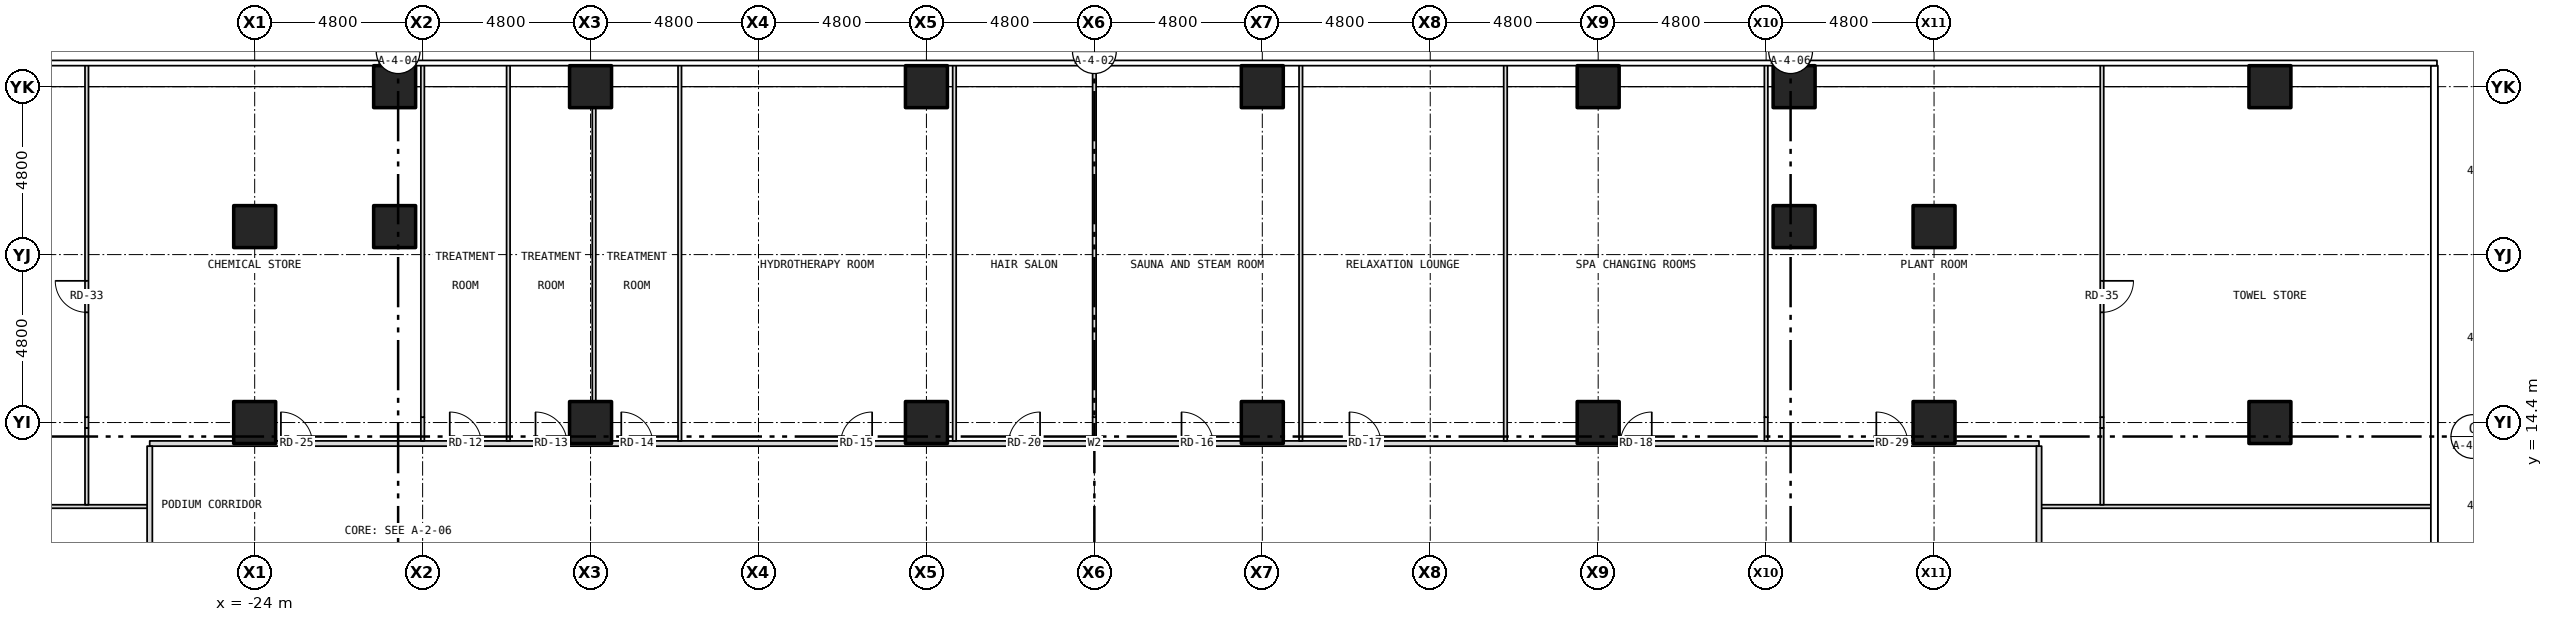
"""IFC4 building model, lengths in metres.
Left out: names, types, materials, properties, quantities, classifications, styles, units other than length and angle.
Written with IfcOpenShell. Run it as: python <this file> out.ifc"""

import sys

from ifc_helpers import new_model, si_unit, direction, frame, frame_2d, origin, origin_2d, place, context, subcontext, project, spatial, rectangle, hollow_rectangle, extrude, element, fill, save


model = new_model("IFC4")
c1 = context("Model", 3, precision=1e-05, world=origin(), true_north=direction((0.0, 1.0)))
c2 = subcontext(c1, "Body", "Model", "MODEL_VIEW")
j1 = project(units=[si_unit("LENGTHUNIT", "METRE"), si_unit("PLANEANGLEUNIT", "RADIAN")], contexts=[c1])
p1 = place(None, origin())
s1 = spatial("IfcSite", under=j1, at=p1, CompositionType="ELEMENT")
p2 = place(p1, origin())
s2 = spatial("IfcBuilding", under=s1, at=p2, CompositionType="ELEMENT")
p3 = place(p2, frame((0.0, 0.0, 20.0)))
s3 = spatial("IfcBuildingStorey", under=s2, at=p3, CompositionType="ELEMENT", Elevation=20.0)
for number, where, z_axis, x_axis in (
    (1, (-20.0, 24.0, -0.2), (0.0, 0.0, 1.0), (1.0, 0.0, 0.0)),
    (2, (-14.4, 24.0, -0.2), (0.0, 0.0, 1.0), (1.0, 0.0, 0.0)),
    (3, (-4.8, 24.0, -0.2), (0.0, 0.0, 1.0), (1.0, 0.0, 0.0)),
    (4, (4.8, 24.0, -0.2), (0.0, 0.0, 1.0), (1.0, 0.0, 0.0)),
    (5, (14.4, 24.0, -0.2), (0.0, 0.0, 1.0), (1.0, 0.0, 0.0)),
    (6, (20.0, 24.0, -0.2), (0.0, 0.0, 1.0), (1.0, 0.0, 0.0)),
    (7, (33.6, 14.4, -0.2), (0.0, 0.0, 1.0), (1.0, 0.0, 0.0)),
    (8, (33.6, 24.0, -0.2), (0.0, 0.0, 1.0), (1.0, 0.0, 0.0)),
    (9, (-24.0, 14.4, -0.2), (0.0, 0.0, 1.0), (1.0, 0.0, 0.0)),
    (10, (-24.0, 20.0, -0.2), (0.0, 0.0, 1.0), (1.0, 0.0, 0.0)),
    (11, (-20.0, 20.0, -0.2), (0.0, 0.0, 1.0), (1.0, 0.0, 0.0)),
    (12, (-14.4, 14.4, -0.2), (0.0, 0.0, 1.0), (1.0, 0.0, 0.0)),
    (13, (-4.8, 14.4, -0.2), (0.0, 0.0, 1.0), (1.0, 0.0, 0.0)),
    (14, (4.8, 14.4, -0.2), (0.0, 0.0, 1.0), (1.0, 0.0, 0.0)),
    (15, (14.4, 14.4, -0.2), (0.0, 0.0, 1.0), (1.0, 0.0, 0.0)),
    (16, (20.0, 20.0, -0.2), (0.0, 0.0, 1.0), (1.0, 0.0, 0.0)),
    (17, (24.0, 14.4, -0.2), (0.0, 0.0, 1.0), (1.0, 0.0, 0.0)),
    (18, (24.0, 20.0, -0.2), (0.0, 0.0, 1.0), (1.0, 0.0, 0.0)),
):
    element("IfcColumn", number, at=place(p3, frame(where, z_axis=z_axis, x_axis=x_axis)), inside=s3, PredefinedType="COLUMN", context=c2, shape_type="SweptSolid", body=[
        extrude(hollow_rectangle(XDim=1.2, YDim=1.2, WallThickness=0.07, at=origin_2d()), origin(), (0.0, 0.0, 1.0), 4.5),
    ])
for number, where, z_axis, x_axis in (
    (19, (-38.28, 12.0, 0.0), (0.0, 0.0, 1.0), (1.0, 0.0, 0.0)),
    (20, (27.0, 12.0, 0.0), (0.0, 0.0, 1.0), (1.0, 0.0, 0.0)),
):
    element("IfcWall", number, at=place(p3, frame(where, z_axis=z_axis, x_axis=x_axis)), inside=s3, PredefinedType="PARTITIONING", context=c2, shape_type="SweptSolid", body=[
        extrude(rectangle(XDim=11.28, YDim=0.1, at=frame_2d((5.64, 0.0))), origin(), (0.0, 0.0, 1.0), 4.3),
    ])
p4 = place(p3, frame((-27.0, 13.8, 0.0), z_axis=(0.0, 0.0, 1.0), x_axis=(1.0, 0.0, 0.0)))
e21 = element("IfcWall", 21, at=p4, inside=s3, PredefinedType="PARTITIONING", context=c2, shape_type="SweptSolid", body=[
    extrude(rectangle(XDim=54.0, YDim=0.15, at=frame_2d((27.0, 0.0))), origin(), (0.0, 0.0, 1.0), 4.3),
])
p5 = place(p4, frame((8.576, 0.0, 0.0)))
e22 = element("IfcOpeningElement", 22, at=p5, cuts=e21, PredefinedType="OPENING", context=c2, shape_type="SweptSolid", body=[
    extrude(rectangle(XDim=0.9, YDim=2.1, at=frame_2d((0.45, 1.05))), frame((0.0, 0.087, 0.0), z_axis=(0.0, -1.0, 0.0), x_axis=(1.0, 0.0, 0.0)), (0.0, 0.0, 1.0), 0.174),
])
p6 = place(p4, frame((11.027, 0.0, 0.0)))
e23 = element("IfcOpeningElement", 23, at=p6, cuts=e21, PredefinedType="OPENING", context=c2, shape_type="SweptSolid", body=[
    extrude(rectangle(XDim=0.9, YDim=2.1, at=frame_2d((0.45, 1.05))), frame((0.0, 0.087, 0.0), z_axis=(0.0, -1.0, 0.0), x_axis=(1.0, 0.0, 0.0)), (0.0, 0.0, 1.0), 0.174),
])
p7 = place(p4, frame((13.478, 0.0, 0.0)))
e24 = element("IfcOpeningElement", 24, at=p7, cuts=e21, PredefinedType="OPENING", context=c2, shape_type="SweptSolid", body=[
    extrude(rectangle(XDim=0.9, YDim=2.1, at=frame_2d((0.45, 1.05))), frame((0.0, 0.087, 0.0), z_axis=(0.0, -1.0, 0.0), x_axis=(1.0, 0.0, 0.0)), (0.0, 0.0, 1.0), 0.174),
])
p8 = place(p4, frame((19.748, 0.0, 0.0)))
e25 = element("IfcOpeningElement", 25, at=p8, cuts=e21, PredefinedType="OPENING", context=c2, shape_type="SweptSolid", body=[
    extrude(rectangle(XDim=0.9, YDim=2.1, at=frame_2d((0.45, 1.05))), frame((0.0, 0.087, 0.0), z_axis=(0.0, -1.0, 0.0), x_axis=(1.0, 0.0, 0.0)), (0.0, 0.0, 1.0), 0.174),
])
p9 = place(p4, frame((29.491, 0.0, 0.0)))
e26 = element("IfcOpeningElement", 26, at=p9, cuts=e21, PredefinedType="OPENING", context=c2, shape_type="SweptSolid", body=[
    extrude(rectangle(XDim=0.9, YDim=2.1, at=frame_2d((0.45, 1.05))), frame((0.0, 0.087, 0.0), z_axis=(0.0, -1.0, 0.0), x_axis=(1.0, 0.0, 0.0)), (0.0, 0.0, 1.0), 0.174),
])
p10 = place(p4, frame((34.291, 0.0, 0.0)))
e27 = element("IfcOpeningElement", 27, at=p10, cuts=e21, PredefinedType="OPENING", context=c2, shape_type="SweptSolid", body=[
    extrude(rectangle(XDim=0.9, YDim=2.1, at=frame_2d((0.45, 1.05))), frame((0.0, 0.087, 0.0), z_axis=(0.0, -1.0, 0.0), x_axis=(1.0, 0.0, 0.0)), (0.0, 0.0, 1.0), 0.174),
])
p11 = place(p4, frame((42.032, 0.0, 0.0)))
e28 = element("IfcOpeningElement", 28, at=p11, cuts=e21, PredefinedType="OPENING", context=c2, shape_type="SweptSolid", body=[
    extrude(rectangle(XDim=0.9, YDim=2.1, at=frame_2d((0.45, 1.05))), frame((0.0, 0.087, 0.0), z_axis=(0.0, -1.0, 0.0), x_axis=(1.0, 0.0, 0.0)), (0.0, 0.0, 1.0), 0.174),
])
p12 = place(p4, frame((24.548, 0.0, 0.0)))
e29 = element("IfcOpeningElement", 29, at=p12, cuts=e21, PredefinedType="OPENING", context=c2, shape_type="SweptSolid", body=[
    extrude(rectangle(XDim=0.9, YDim=2.1, at=frame_2d((0.45, 1.05))), frame((0.0, 0.087, 0.0), z_axis=(0.0, -1.0, 0.0), x_axis=(1.0, 0.0, 0.0)), (0.0, 0.0, 1.0), 0.174),
])
p13 = place(p4, frame((3.75, 0.0, 0.0)))
e30 = element("IfcOpeningElement", 30, at=p13, cuts=e21, PredefinedType="OPENING", context=c2, shape_type="SweptSolid", body=[
    extrude(rectangle(XDim=0.9, YDim=2.1, at=frame_2d((0.45, 1.05))), frame((0.0, 0.087, 0.0), z_axis=(0.0, -1.0, 0.0), x_axis=(1.0, 0.0, 0.0)), (0.0, 0.0, 1.0), 0.174),
])
p14 = place(p4, frame((49.35, 0.0, 0.0)))
e31 = element("IfcOpeningElement", 31, at=p14, cuts=e21, PredefinedType="OPENING", context=c2, shape_type="SweptSolid", body=[
    extrude(rectangle(XDim=0.9, YDim=2.1, at=frame_2d((0.45, 1.05))), frame((0.0, 0.087, 0.0), z_axis=(0.0, -1.0, 0.0), x_axis=(1.0, 0.0, 0.0)), (0.0, 0.0, 1.0), 0.174),
])
p15 = place(p3, frame((-28.8, 12.05, 0.0), z_axis=(0.0, 0.0, 1.0), x_axis=(0.0, 1.0, 0.0)))
e32 = element("IfcWall", 32, at=p15, inside=s3, PredefinedType="PARTITIONING", context=c2, shape_type="SweptSolid", body=[
    extrude(rectangle(XDim=2.196, YDim=0.1, at=frame_2d((1.098, 0.0))), origin(), (0.0, 0.0, 1.0), 3.683),
])
p16 = place(p3, frame((-28.8, 14.246, 0.0), z_axis=(0.0, 0.0, 1.0), x_axis=(0.0, 1.0, 0.0)))
e33 = element("IfcWall", 33, at=p16, inside=s3, PredefinedType="PARTITIONING", context=c2, shape_type="SweptSolid", body=[
    extrude(rectangle(XDim=0.308, YDim=0.1, at=frame_2d((0.154, 0.0))), origin(), (0.0, 0.0, 1.0), 4.3),
])
p17 = place(p3, frame((-28.8, 14.554, 0.0), z_axis=(0.0, 0.0, 1.0), x_axis=(0.0, 1.0, 0.0)))
e34 = element("IfcWall", 34, at=p17, inside=s3, PredefinedType="PARTITIONING", context=c2, shape_type="SweptSolid", body=[
    extrude(rectangle(XDim=10.076, YDim=0.1, at=frame_2d((5.038, 0.0))), origin(), (0.0, 0.0, 1.0), 3.683),
])
p18 = place(p17, frame((2.996, 0.0, 0.0)))
e35 = element("IfcOpeningElement", 35, at=p18, cuts=e34, PredefinedType="OPENING", context=c2, shape_type="SweptSolid", body=[
    extrude(rectangle(XDim=0.9, YDim=2.1, at=frame_2d((0.45, 1.05))), frame((0.0, 0.062, 0.0), z_axis=(0.0, -1.0, 0.0), x_axis=(1.0, 0.0, 0.0)), (0.0, 0.0, 1.0), 0.124),
])
p19 = place(p3, frame((-27.0, -13.725, 0.0), z_axis=(0.0, 0.0, 1.0), x_axis=(0.0, 1.0, 0.0)))
e36 = element("IfcWall", 36, at=p19, inside=s3, PredefinedType="PARTITIONING", context=c2, shape_type="SweptSolid", body=[
    extrude(rectangle(XDim=27.45, YDim=0.15, at=frame_2d((13.725, 0.0))), origin(), (0.0, 0.0, 1.0), 4.3),
])
p20 = place(p19, frame((7.275, 0.0, 0.0)))
e37 = element("IfcOpeningElement", 37, at=p20, cuts=e36, PredefinedType="OPENING", context=c2, shape_type="SweptSolid", body=[
    extrude(rectangle(XDim=0.9, YDim=2.1, at=frame_2d((0.45, 1.05))), frame((0.0, 0.087, 0.0), z_axis=(0.0, -1.0, 0.0), x_axis=(1.0, 0.0, 0.0)), (0.0, 0.0, 1.0), 0.174),
])
p21 = place(p19, frame((19.275, 0.0, 0.0)))
e38 = element("IfcOpeningElement", 38, at=p21, cuts=e36, PredefinedType="OPENING", context=c2, shape_type="SweptSolid", body=[
    extrude(rectangle(XDim=0.9, YDim=2.1, at=frame_2d((0.45, 1.05))), frame((0.0, 0.087, 0.0), z_axis=(0.0, -1.0, 0.0), x_axis=(1.0, 0.0, 0.0)), (0.0, 0.0, 1.0), 0.174),
])
p22 = place(p3, frame((-19.2, 13.875, 0.0), z_axis=(0.0, 0.0, 1.0), x_axis=(0.0, 1.0, 0.0)))
e39 = element("IfcWall", 39, at=p22, inside=s3, PredefinedType="PARTITIONING", context=c2, shape_type="SweptSolid", body=[
    extrude(rectangle(XDim=0.679, YDim=0.1, at=frame_2d((0.339, 0.0))), origin(), (0.0, 0.0, 1.0), 4.3),
])
p23 = place(p3, frame((-19.2, 14.554, 0.0), z_axis=(0.0, 0.0, 1.0), x_axis=(0.0, 1.0, 0.0)))
e40 = element("IfcWall", 40, at=p23, inside=s3, PredefinedType="PARTITIONING", context=c2, shape_type="SweptSolid", body=[
    extrude(rectangle(XDim=10.076, YDim=0.1, at=frame_2d((5.038, 0.0))), origin(), (0.0, 0.0, 1.0), 3.683),
])
p24 = place(p3, frame((-16.75, 13.875, 0.0), z_axis=(0.0, 0.0, 1.0), x_axis=(0.0, 1.0, 0.0)))
e41 = element("IfcWall", 41, at=p24, inside=s3, PredefinedType="PARTITIONING", context=c2, shape_type="SweptSolid", body=[
    extrude(rectangle(XDim=10.755, YDim=0.1, at=frame_2d((5.377, 0.0))), origin(), (0.0, 0.0, 1.0), 4.3),
])
p25 = place(p3, frame((-14.3, 13.875, 0.0), z_axis=(0.0, 0.0, 1.0), x_axis=(0.0, 1.0, 0.0)))
e42 = element("IfcWall", 42, at=p25, inside=s3, PredefinedType="PARTITIONING", context=c2, shape_type="SweptSolid", body=[
    extrude(rectangle(XDim=1.125, YDim=0.1, at=frame_2d((0.562, 0.0))), origin(), (0.0, 0.0, 1.0), 4.3),
])
p26 = place(p3, frame((-14.3, 15.0, 0.0), z_axis=(0.0, 0.0, 1.0), x_axis=(0.0, 1.0, 0.0)))
e43 = element("IfcWall", 43, at=p26, inside=s3, PredefinedType="PARTITIONING", context=c2, shape_type="SweptSolid", body=[
    extrude(rectangle(XDim=8.4, YDim=0.1, at=frame_2d((4.2, 0.0))), origin(), (0.0, 0.0, 1.0), 3.373),
])
p27 = place(p3, frame((-14.3, 23.4, 0.0), z_axis=(0.0, 0.0, 1.0), x_axis=(0.0, 1.0, 0.0)))
e44 = element("IfcWall", 44, at=p27, inside=s3, PredefinedType="PARTITIONING", context=c2, shape_type="SweptSolid", body=[
    extrude(rectangle(XDim=0.48, YDim=0.1, at=frame_2d((0.24, 0.0))), origin(), (0.0, 0.0, 1.0), 4.3),
])
for number, where, z_axis, x_axis in (
    (45, (-11.85, 13.875, 0.0), (0.0, 0.0, 1.0), (0.0, 1.0, 0.0)),
    (46, (-4.0, 13.875, 0.0), (0.0, 0.0, 1.0), (0.0, 1.0, 0.0)),
):
    element("IfcWall", number, at=place(p3, frame(where, z_axis=z_axis, x_axis=x_axis)), inside=s3, PredefinedType="PARTITIONING", context=c2, shape_type="SweptSolid", body=[
        extrude(rectangle(XDim=10.755, YDim=0.1, at=frame_2d((5.377, 0.0))), origin(), (0.0, 0.0, 1.0), 4.3),
    ])
p28 = place(p3, frame((0.0, 13.875, 0.0), z_axis=(0.0, 0.0, 1.0), x_axis=(0.0, 1.0, 0.0)))
e47 = element("IfcWall", 47, at=p28, inside=s3, PredefinedType="PARTITIONING", context=c2, shape_type="SweptSolid", body=[
    extrude(rectangle(XDim=0.679, YDim=0.1, at=frame_2d((0.339, 0.0))), origin(), (0.0, 0.0, 1.0), 4.3),
])
p29 = place(p3, frame((0.0, 14.554, 0.0), z_axis=(0.0, 0.0, 1.0), x_axis=(0.0, 1.0, 0.0)))
e48 = element("IfcWall", 48, at=p29, inside=s3, PredefinedType="PARTITIONING", context=c2, shape_type="SweptSolid", body=[
    extrude(rectangle(XDim=10.076, YDim=0.1, at=frame_2d((5.038, 0.0))), origin(), (0.0, 0.0, 1.0), 3.683),
])
for number, where, z_axis, x_axis in (
    (49, (5.9, 13.875, 0.0), (0.0, 0.0, 1.0), (0.0, 1.0, 0.0)),
    (50, (11.75, 13.875, 0.0), (0.0, 0.0, 1.0), (0.0, 1.0, 0.0)),
):
    element("IfcWall", number, at=place(p3, frame(where, z_axis=z_axis, x_axis=x_axis)), inside=s3, PredefinedType="PARTITIONING", context=c2, shape_type="SweptSolid", body=[
        extrude(rectangle(XDim=10.755, YDim=0.1, at=frame_2d((5.377, 0.0))), origin(), (0.0, 0.0, 1.0), 4.3),
    ])
p30 = place(p3, frame((19.2, 13.875, 0.0), z_axis=(0.0, 0.0, 1.0), x_axis=(0.0, 1.0, 0.0)))
e51 = element("IfcWall", 51, at=p30, inside=s3, PredefinedType="PARTITIONING", context=c2, shape_type="SweptSolid", body=[
    extrude(rectangle(XDim=0.679, YDim=0.1, at=frame_2d((0.339, 0.0))), origin(), (0.0, 0.0, 1.0), 4.3),
])
p31 = place(p3, frame((19.2, 14.554, 0.0), z_axis=(0.0, 0.0, 1.0), x_axis=(0.0, 1.0, 0.0)))
e52 = element("IfcWall", 52, at=p31, inside=s3, PredefinedType="PARTITIONING", context=c2, shape_type="SweptSolid", body=[
    extrude(rectangle(XDim=10.076, YDim=0.1, at=frame_2d((5.038, 0.0))), origin(), (0.0, 0.0, 1.0), 3.683),
])
p32 = place(p3, frame((27.0, -13.725, 0.0), z_axis=(0.0, 0.0, 1.0), x_axis=(0.0, 1.0, 0.0)))
e53 = element("IfcWall", 53, at=p32, inside=s3, PredefinedType="PARTITIONING", context=c2, shape_type="SweptSolid", body=[
    extrude(rectangle(XDim=27.45, YDim=0.15, at=frame_2d((13.725, 0.0))), origin(), (0.0, 0.0, 1.0), 4.3),
])
p33 = place(p32, frame((7.275, 0.0, 0.0)))
e54 = element("IfcOpeningElement", 54, at=p33, cuts=e53, PredefinedType="OPENING", context=c2, shape_type="SweptSolid", body=[
    extrude(rectangle(XDim=0.9, YDim=2.1, at=frame_2d((0.45, 1.05))), frame((0.0, 0.087, 0.0), z_axis=(0.0, -1.0, 0.0), x_axis=(1.0, 0.0, 0.0)), (0.0, 0.0, 1.0), 0.174),
])
p34 = place(p32, frame((19.275, 0.0, 0.0)))
e55 = element("IfcOpeningElement", 55, at=p34, cuts=e53, PredefinedType="OPENING", context=c2, shape_type="SweptSolid", body=[
    extrude(rectangle(XDim=0.9, YDim=2.1, at=frame_2d((0.45, 1.05))), frame((0.0, 0.087, 0.0), z_axis=(0.0, -1.0, 0.0), x_axis=(1.0, 0.0, 0.0)), (0.0, 0.0, 1.0), 0.174),
])
p35 = place(p3, frame((28.8, 12.05, 0.0), z_axis=(0.0, 0.0, 1.0), x_axis=(0.0, 1.0, 0.0)))
e56 = element("IfcWall", 56, at=p35, inside=s3, PredefinedType="PARTITIONING", context=c2, shape_type="SweptSolid", body=[
    extrude(rectangle(XDim=2.196, YDim=0.1, at=frame_2d((1.098, 0.0))), origin(), (0.0, 0.0, 1.0), 3.683),
])
p36 = place(p3, frame((28.8, 14.246, 0.0), z_axis=(0.0, 0.0, 1.0), x_axis=(0.0, 1.0, 0.0)))
e57 = element("IfcWall", 57, at=p36, inside=s3, PredefinedType="PARTITIONING", context=c2, shape_type="SweptSolid", body=[
    extrude(rectangle(XDim=0.308, YDim=0.1, at=frame_2d((0.154, 0.0))), origin(), (0.0, 0.0, 1.0), 4.3),
])
p37 = place(p3, frame((28.8, 14.554, 0.0), z_axis=(0.0, 0.0, 1.0), x_axis=(0.0, 1.0, 0.0)))
e58 = element("IfcWall", 58, at=p37, inside=s3, PredefinedType="PARTITIONING", context=c2, shape_type="SweptSolid", body=[
    extrude(rectangle(XDim=10.076, YDim=0.1, at=frame_2d((5.038, 0.0))), origin(), (0.0, 0.0, 1.0), 3.683),
])
p38 = place(p37, frame((2.996, 0.0, 0.0)))
e59 = element("IfcOpeningElement", 59, at=p38, cuts=e58, PredefinedType="OPENING", context=c2, shape_type="SweptSolid", body=[
    extrude(rectangle(XDim=0.9, YDim=2.1, at=frame_2d((0.45, 1.05))), frame((0.0, 0.062, 0.0), z_axis=(0.0, -1.0, 0.0), x_axis=(1.0, 0.0, 0.0)), (0.0, 0.0, 1.0), 0.124),
])
p39 = place(p5, origin())
e60 = element("IfcDoor", 60, at=p39, inside=s3, OperationType="SINGLE_SWING_LEFT", PredefinedType="DOOR", context=c2, shape_type="SweptSolid", body=[
    extrude(rectangle(XDim=0.9, YDim=2.1, at=frame_2d((0.45, 1.05))), frame((0.0, 0.025, 0.0), z_axis=(0.0, -1.0, 0.0), x_axis=(1.0, 0.0, 0.0)), (0.0, 0.0, 1.0), 0.05),
])
fill(e22, e60)
p40 = place(p6, origin())
e61 = element("IfcDoor", 61, at=p40, inside=s3, OperationType="SINGLE_SWING_LEFT", PredefinedType="DOOR", context=c2, shape_type="SweptSolid", body=[
    extrude(rectangle(XDim=0.9, YDim=2.1, at=frame_2d((0.45, 1.05))), frame((0.0, 0.025, 0.0), z_axis=(0.0, -1.0, 0.0), x_axis=(1.0, 0.0, 0.0)), (0.0, 0.0, 1.0), 0.05),
])
fill(e23, e61)
p41 = place(p7, origin())
e62 = element("IfcDoor", 62, at=p41, inside=s3, OperationType="SINGLE_SWING_LEFT", PredefinedType="DOOR", context=c2, shape_type="SweptSolid", body=[
    extrude(rectangle(XDim=0.9, YDim=2.1, at=frame_2d((0.45, 1.05))), frame((0.0, 0.025, 0.0), z_axis=(0.0, -1.0, 0.0), x_axis=(1.0, 0.0, 0.0)), (0.0, 0.0, 1.0), 0.05),
])
fill(e24, e62)
p42 = place(p8, origin())
e63 = element("IfcDoor", 63, at=p42, inside=s3, OperationType="SINGLE_SWING_RIGHT", PredefinedType="DOOR", context=c2, shape_type="SweptSolid", body=[
    extrude(rectangle(XDim=0.9, YDim=2.1, at=frame_2d((0.45, 1.05))), frame((0.0, 0.025, 0.0), z_axis=(0.0, -1.0, 0.0), x_axis=(1.0, 0.0, 0.0)), (0.0, 0.0, 1.0), 0.05),
])
fill(e25, e63)
p43 = place(p9, origin())
e64 = element("IfcDoor", 64, at=p43, inside=s3, OperationType="SINGLE_SWING_LEFT", PredefinedType="DOOR", context=c2, shape_type="SweptSolid", body=[
    extrude(rectangle(XDim=0.9, YDim=2.1, at=frame_2d((0.45, 1.05))), frame((0.0, 0.025, 0.0), z_axis=(0.0, -1.0, 0.0), x_axis=(1.0, 0.0, 0.0)), (0.0, 0.0, 1.0), 0.05),
])
fill(e26, e64)
p44 = place(p10, origin())
e65 = element("IfcDoor", 65, at=p44, inside=s3, OperationType="SINGLE_SWING_LEFT", PredefinedType="DOOR", context=c2, shape_type="SweptSolid", body=[
    extrude(rectangle(XDim=0.9, YDim=2.1, at=frame_2d((0.45, 1.05))), frame((0.0, 0.025, 0.0), z_axis=(0.0, -1.0, 0.0), x_axis=(1.0, 0.0, 0.0)), (0.0, 0.0, 1.0), 0.05),
])
fill(e27, e65)
p45 = place(p11, origin())
e66 = element("IfcDoor", 66, at=p45, inside=s3, OperationType="SINGLE_SWING_RIGHT", PredefinedType="DOOR", context=c2, shape_type="SweptSolid", body=[
    extrude(rectangle(XDim=0.9, YDim=2.1, at=frame_2d((0.45, 1.05))), frame((0.0, 0.025, 0.0), z_axis=(0.0, -1.0, 0.0), x_axis=(1.0, 0.0, 0.0)), (0.0, 0.0, 1.0), 0.05),
])
fill(e28, e66)
p46 = place(p12, origin())
e67 = element("IfcDoor", 67, at=p46, inside=s3, OperationType="SINGLE_SWING_RIGHT", PredefinedType="DOOR", context=c2, shape_type="SweptSolid", body=[
    extrude(rectangle(XDim=0.9, YDim=2.1, at=frame_2d((0.45, 1.05))), frame((0.0, 0.025, 0.0), z_axis=(0.0, -1.0, 0.0), x_axis=(1.0, 0.0, 0.0)), (0.0, 0.0, 1.0), 0.05),
])
fill(e29, e67)
p47 = place(p13, origin())
e68 = element("IfcDoor", 68, at=p47, inside=s3, OperationType="SINGLE_SWING_LEFT", PredefinedType="DOOR", context=c2, shape_type="SweptSolid", body=[
    extrude(rectangle(XDim=0.9, YDim=2.1, at=frame_2d((0.45, 1.05))), frame((0.0, 0.025, 0.0), z_axis=(0.0, -1.0, 0.0), x_axis=(1.0, 0.0, 0.0)), (0.0, 0.0, 1.0), 0.05),
])
fill(e30, e68)
p48 = place(p14, origin())
e69 = element("IfcDoor", 69, at=p48, inside=s3, OperationType="SINGLE_SWING_LEFT", PredefinedType="DOOR", context=c2, shape_type="SweptSolid", body=[
    extrude(rectangle(XDim=0.9, YDim=2.1, at=frame_2d((0.45, 1.05))), frame((0.0, 0.025, 0.0), z_axis=(0.0, -1.0, 0.0), x_axis=(1.0, 0.0, 0.0)), (0.0, 0.0, 1.0), 0.05),
])
fill(e31, e69)
p49 = place(p18, origin())
e70 = element("IfcDoor", 70, at=p49, inside=s3, OperationType="SINGLE_SWING_RIGHT", PredefinedType="DOOR", context=c2, shape_type="SweptSolid", body=[
    extrude(rectangle(XDim=0.9, YDim=2.1, at=frame_2d((0.45, 1.05))), frame((0.0, 0.025, 0.0), z_axis=(0.0, -1.0, 0.0), x_axis=(1.0, 0.0, 0.0)), (0.0, 0.0, 1.0), 0.05),
])
fill(e35, e70)
p50 = place(p38, origin())
e71 = element("IfcDoor", 71, at=p50, inside=s3, OperationType="SINGLE_SWING_RIGHT", PredefinedType="DOOR", context=c2, shape_type="SweptSolid", body=[
    extrude(rectangle(XDim=0.9, YDim=2.1, at=frame_2d((0.45, 1.05))), frame((0.0, 0.025, 0.0), z_axis=(0.0, -1.0, 0.0), x_axis=(1.0, 0.0, 0.0)), (0.0, 0.0, 1.0), 0.05),
])
fill(e59, e71)
save(model, sys.argv[1])
